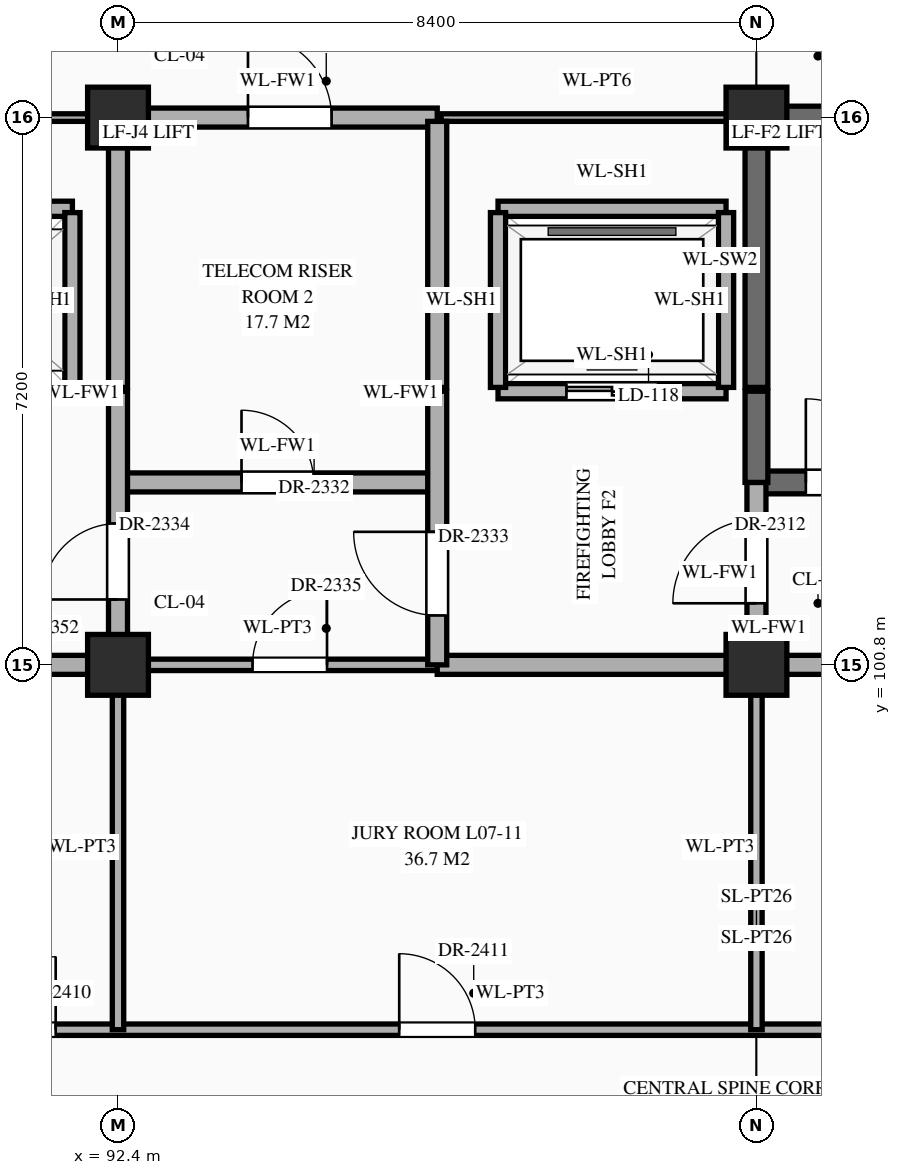
"""IFC4 building model, lengths in metres.
Left out: names, types, materials, properties, quantities, classifications, styles, units other than length and angle.
Written with IfcOpenShell. Run it as: python <this file> out.ifc"""

import sys

from ifc_helpers import new_model, si_unit, direction, frame, frame_2d, origin, origin_2d, place, context, subcontext, project, spatial, rectangle, extrude, element, fill, save


model = new_model("IFC4")
c1 = context("Model", 3, precision=1e-05, world=origin(), true_north=direction((0.0, 1.0)))
c2 = subcontext(c1, "Body", "Model", "MODEL_VIEW")
j1 = project(units=[si_unit("LENGTHUNIT", "METRE"), si_unit("PLANEANGLEUNIT", "RADIAN")], contexts=[c1])
p1 = place(None, origin())
s1 = spatial("IfcSite", under=j1, at=p1, CompositionType="ELEMENT")
p2 = place(p1, origin())
s2 = spatial("IfcBuilding", under=s1, at=p2, CompositionType="ELEMENT")
p3 = place(p2, frame((0.0, 0.0, 30.6)))
s3 = spatial("IfcBuildingStorey", under=s2, at=p3, CompositionType="ELEMENT", Elevation=30.6)
for number, where, z_axis, x_axis in (
    (1, (92.4, 100.8, 0.0), (0.0, 0.0, 1.0), (1.0, 0.0, 0.0)),
    (2, (92.4, 108.0, 0.0), (0.0, 0.0, 1.0), (1.0, 0.0, 0.0)),
    (3, (100.8, 100.8, 0.0), (0.0, 0.0, 1.0), (1.0, 0.0, 0.0)),
    (4, (100.8, 108.0, 0.0), (0.0, 0.0, 1.0), (1.0, 0.0, 0.0)),
):
    element("IfcColumn", number, at=place(p3, frame(where, z_axis=z_axis, x_axis=x_axis)), inside=s3, PredefinedType="COLUMN", context=c2, shape_type="SweptSolid", body=[
        extrude(rectangle(XDim=0.8, YDim=0.8, at=origin_2d()), origin(), (0.0, 0.0, 1.0), 4.5),
    ])
p4 = place(p3, frame((89.8, 96.0, 0.0), z_axis=(0.0, 0.0, 1.0), x_axis=(1.0, 0.0, 0.0)))
e5 = element("IfcWall", 5, at=p4, inside=s3, PredefinedType="STANDARD", context=c2, shape_type="SweptSolid", body=[
    extrude(rectangle(XDim=19.4, YDim=0.15, at=frame_2d((9.7, 0.0))), origin(), (0.0, 0.0, 1.0), 4.24),
])
p5 = place(p4, frame((0.82, 0.0, 0.0)))
e6 = element("IfcOpeningElement", 6, at=p5, cuts=e5, PredefinedType="OPENING", context=c2, shape_type="SweptSolid", body=[
    extrude(rectangle(XDim=0.96, YDim=2.2, at=frame_2d((0.48, 1.1))), frame((0.0, 0.087, 0.0), z_axis=(0.0, -1.0, 0.0), x_axis=(1.0, 0.0, 0.0)), (0.0, 0.0, 1.0), 0.174),
])
p6 = place(p4, frame((6.3, 0.0, 0.0)))
e7 = element("IfcOpeningElement", 7, at=p6, cuts=e5, PredefinedType="OPENING", context=c2, shape_type="SweptSolid", body=[
    extrude(rectangle(XDim=1.0, YDim=2.25, at=frame_2d((0.5, 1.125))), frame((0.0, 0.087, 0.0), z_axis=(0.0, -1.0, 0.0), x_axis=(1.0, 0.0, 0.0)), (0.0, 0.0, 1.0), 0.174),
])
p7 = place(p4, frame((14.68, 0.0, 0.0)))
e8 = element("IfcOpeningElement", 8, at=p7, cuts=e5, PredefinedType="OPENING", context=c2, shape_type="SweptSolid", body=[
    extrude(rectangle(XDim=1.04, YDim=2.2, at=frame_2d((0.52, 1.1))), frame((0.0, 0.087, 0.0), z_axis=(0.0, -1.0, 0.0), x_axis=(1.0, 0.0, 0.0)), (0.0, 0.0, 1.0), 0.174),
])
p8 = place(p3, frame((75.6, 100.8, 0.0), z_axis=(0.0, 0.0, 1.0), x_axis=(1.0, 0.0, 0.0)))
e9 = element("IfcWall", 9, at=p8, inside=s3, PredefinedType="STANDARD", context=c2, shape_type="SweptSolid", body=[
    extrude(rectangle(XDim=16.8, YDim=0.25, at=frame_2d((8.4, 0.0))), origin(), (0.0, 0.0, 1.0), 3.39),
])
p9 = place(p8, frame((3.65, 0.0, 0.0)))
e10 = element("IfcOpeningElement", 10, at=p9, cuts=e9, PredefinedType="OPENING", context=c2, shape_type="SweptSolid", body=[
    extrude(rectangle(XDim=1.1, YDim=2.2, at=frame_2d((0.55, 1.1))), frame((0.0, 0.137, 0.0), z_axis=(0.0, -1.0, 0.0), x_axis=(1.0, 0.0, 0.0)), (0.0, 0.0, 1.0), 0.274),
])
p10 = place(p8, frame((9.785, 0.0, 0.0)))
e11 = element("IfcOpeningElement", 11, at=p10, cuts=e9, PredefinedType="OPENING", context=c2, shape_type="SweptSolid", body=[
    extrude(rectangle(XDim=0.95, YDim=2.15, at=frame_2d((0.475, 1.075))), frame((0.0, 0.137, 0.0), z_axis=(0.0, -1.0, 0.0), x_axis=(1.0, 0.0, 0.0)), (0.0, 0.0, 1.0), 0.274),
])
p11 = place(p8, frame((12.45, 0.0, 0.0)))
e12 = element("IfcOpeningElement", 12, at=p11, cuts=e9, PredefinedType="OPENING", context=c2, shape_type="SweptSolid", body=[
    extrude(rectangle(XDim=1.1, YDim=2.2, at=frame_2d((0.55, 1.1))), frame((0.0, 0.137, 0.0), z_axis=(0.0, -1.0, 0.0), x_axis=(1.0, 0.0, 0.0)), (0.0, 0.0, 1.0), 0.274),
])
p12 = place(p8, frame((14.84, 0.0, 0.0)))
e13 = element("IfcOpeningElement", 13, at=p12, cuts=e9, PredefinedType="OPENING", context=c2, shape_type="SweptSolid", body=[
    extrude(rectangle(XDim=1.0, YDim=2.2, at=frame_2d((0.5, 1.1))), frame((0.0, 0.137, 0.0), z_axis=(0.0, -1.0, 0.0), x_axis=(1.0, 0.0, 0.0)), (0.0, 0.0, 1.0), 0.274),
])
p13 = place(p3, frame((92.4, 100.8, 0.0), z_axis=(0.0, 0.0, 1.0), x_axis=(1.0, 0.0, 0.0)))
e14 = element("IfcWall", 14, at=p13, inside=s3, PredefinedType="STANDARD", context=c2, shape_type="SweptSolid", body=[
    extrude(rectangle(XDim=4.2, YDim=0.15, at=frame_2d((2.1, 0.0))), origin(), (0.0, 0.0, 1.0), 3.39),
])
p14 = place(p13, frame((1.77, 0.0, 0.0)))
e15 = element("IfcOpeningElement", 15, at=p14, cuts=e14, PredefinedType="OPENING", context=c2, shape_type="SweptSolid", body=[
    extrude(rectangle(XDim=0.98, YDim=2.35, at=frame_2d((0.49, 1.175))), frame((0.0, 0.087, 0.0), z_axis=(0.0, -1.0, 0.0), x_axis=(1.0, 0.0, 0.0)), (0.0, 0.0, 1.0), 0.174),
])
p15 = place(p3, frame((96.6, 100.8, 0.0), z_axis=(0.0, 0.0, 1.0), x_axis=(1.0, 0.0, 0.0)))
e16 = element("IfcWall", 16, at=p15, inside=s3, PredefinedType="STANDARD", context=c2, shape_type="SweptSolid", body=[
    extrude(rectangle(XDim=12.6, YDim=0.25, at=frame_2d((6.3, 0.0))), origin(), (0.0, 0.0, 1.0), 3.39),
])
p16 = place(p15, frame((7.925, 0.0, 0.0)))
e17 = element("IfcOpeningElement", 17, at=p16, cuts=e16, PredefinedType="OPENING", context=c2, shape_type="SweptSolid", body=[
    extrude(rectangle(XDim=0.95, YDim=2.15, at=frame_2d((0.475, 1.075))), frame((0.0, 0.137, 0.0), z_axis=(0.0, -1.0, 0.0), x_axis=(1.0, 0.0, 0.0)), (0.0, 0.0, 1.0), 0.274),
])
p17 = place(p3, frame((92.4, 103.2, 0.0), z_axis=(0.0, 0.0, 1.0), x_axis=(1.0, 0.0, 0.0)))
e18 = element("IfcWall", 18, at=p17, inside=s3, PredefinedType="STANDARD", context=c2, shape_type="SweptSolid", body=[
    extrude(rectangle(XDim=4.2, YDim=0.25, at=frame_2d((2.1, 0.0))), origin(), (0.0, 0.0, 1.0), 4.24),
])
p18 = place(p17, frame((1.625, 0.0, 0.0)))
e19 = element("IfcOpeningElement", 19, at=p18, cuts=e18, PredefinedType="OPENING", context=c2, shape_type="SweptSolid", body=[
    extrude(rectangle(XDim=0.95, YDim=2.15, at=frame_2d((0.475, 1.075))), frame((0.0, 0.137, 0.0), z_axis=(0.0, -1.0, 0.0), x_axis=(1.0, 0.0, 0.0)), (0.0, 0.0, 1.0), 0.274),
])
p19 = place(p3, frame((100.8, 103.2, 0.0), z_axis=(0.0, 0.0, 1.0), x_axis=(1.0, 0.0, 0.0)))
e20 = element("IfcWall", 20, at=p19, inside=s3, PredefinedType="SHEAR", context=c2, shape_type="SweptSolid", body=[
    extrude(rectangle(XDim=8.4, YDim=0.3, at=frame_2d((4.2, 0.0))), origin(), (0.0, 0.0, 1.0), 4.24),
])
p20 = place(p19, frame((0.65, 0.0, 0.0)))
e21 = element("IfcOpeningElement", 21, at=p20, cuts=e20, PredefinedType="OPENING", context=c2, shape_type="SweptSolid", body=[
    extrude(rectangle(XDim=1.1, YDim=2.2, at=frame_2d((0.55, 1.1))), frame((0.0, 0.162, 0.0), z_axis=(0.0, -1.0, 0.0), x_axis=(1.0, 0.0, 0.0)), (0.0, 0.0, 1.0), 0.324),
])
p21 = place(p3, frame((89.4, 104.4, 0.0), z_axis=(0.0, 0.0, 1.0), x_axis=(1.0, 0.0, 0.0)))
e22 = element("IfcWall", 22, at=p21, inside=s3, PredefinedType="STANDARD", context=c2, shape_type="SweptSolid", body=[
    extrude(rectangle(XDim=2.4, YDim=0.2, at=frame_2d((1.2, 0.0))), origin(), (0.0, 0.0, 1.0), 4.24),
])
p22 = place(p21, frame((0.7, 0.0, 0.0)))
e23 = element("IfcOpeningElement", 23, at=p22, cuts=e22, PredefinedType="OPENING", context=c2, shape_type="SweptSolid", body=[
    extrude(rectangle(XDim=1.0, YDim=2.15, at=frame_2d((0.5, 1.075))), frame((0.0, 0.112, 0.0), z_axis=(0.0, -1.0, 0.0), x_axis=(1.0, 0.0, 0.0)), (0.0, 0.0, 1.0), 0.224),
])
p23 = place(p3, frame((97.4, 104.4, 0.0), z_axis=(0.0, 0.0, 1.0), x_axis=(1.0, 0.0, 0.0)))
e24 = element("IfcWall", 24, at=p23, inside=s3, PredefinedType="STANDARD", context=c2, shape_type="SweptSolid", body=[
    extrude(rectangle(XDim=3.0, YDim=0.2, at=frame_2d((1.5, 0.0))), origin(), (0.0, 0.0, 1.0), 4.24),
])
p24 = place(p23, frame((0.9, 0.0, 0.0)))
e25 = element("IfcOpeningElement", 25, at=p24, cuts=e24, PredefinedType="OPENING", context=c2, shape_type="SweptSolid", body=[
    extrude(rectangle(XDim=1.2, YDim=2.15, at=frame_2d((0.6, 1.075))), frame((0.0, 0.112, 0.0), z_axis=(0.0, -1.0, 0.0), x_axis=(1.0, 0.0, 0.0)), (0.0, 0.0, 1.0), 0.224),
])
p25 = place(p3, frame((89.4, 106.8, 0.0), z_axis=(0.0, 0.0, 1.0), x_axis=(1.0, 0.0, 0.0)))
e26 = element("IfcWall", 26, at=p25, inside=s3, PredefinedType="STANDARD", context=c2, shape_type="SweptSolid", body=[
    extrude(rectangle(XDim=2.4, YDim=0.2, at=frame_2d((1.2, 0.0))), origin(), (0.0, 0.0, 1.0), 4.24),
])
p26 = place(p3, frame((97.4, 106.8, 0.0), z_axis=(0.0, 0.0, 1.0), x_axis=(1.0, 0.0, 0.0)))
e27 = element("IfcWall", 27, at=p26, inside=s3, PredefinedType="STANDARD", context=c2, shape_type="SweptSolid", body=[
    extrude(rectangle(XDim=3.0, YDim=0.2, at=frame_2d((1.5, 0.0))), origin(), (0.0, 0.0, 1.0), 4.24),
])
p27 = place(p3, frame((86.2, 108.0, 0.0), z_axis=(0.0, 0.0, 1.0), x_axis=(1.0, 0.0, 0.0)))
e28 = element("IfcWall", 28, at=p27, inside=s3, PredefinedType="STANDARD", context=c2, shape_type="SweptSolid", body=[
    extrude(rectangle(XDim=6.15, YDim=0.1, at=frame_2d((3.075, 0.0))), origin(), (0.0, 0.0, 1.0), 3.39),
])
p28 = place(p3, frame((92.4, 108.0, 0.0), z_axis=(0.0, 0.0, 1.0), x_axis=(1.0, 0.0, 0.0)))
e29 = element("IfcWall", 29, at=p28, inside=s3, PredefinedType="STANDARD", context=c2, shape_type="SweptSolid", body=[
    extrude(rectangle(XDim=4.2, YDim=0.25, at=frame_2d((2.1, 0.0))), origin(), (0.0, 0.0, 1.0), 3.39),
])
p29 = place(p28, frame((1.71, 0.0, 0.0)))
e30 = element("IfcOpeningElement", 30, at=p29, cuts=e29, PredefinedType="OPENING", context=c2, shape_type="SweptSolid", body=[
    extrude(rectangle(XDim=1.1, YDim=2.2, at=frame_2d((0.55, 1.1))), frame((0.0, 0.137, 0.0), z_axis=(0.0, -1.0, 0.0), x_axis=(1.0, 0.0, 0.0)), (0.0, 0.0, 1.0), 0.274),
])
p30 = place(p3, frame((96.65, 108.0, 0.0), z_axis=(0.0, 0.0, 1.0), x_axis=(1.0, 0.0, 0.0)))
e31 = element("IfcWall", 31, at=p30, inside=s3, PredefinedType="STANDARD", context=c2, shape_type="SweptSolid", body=[
    extrude(rectangle(XDim=4.1, YDim=0.1, at=frame_2d((2.05, 0.0))), origin(), (0.0, 0.0, 1.0), 3.39),
])
p31 = place(p3, frame((100.8, 108.0, 0.0), z_axis=(0.0, 0.0, 1.0), x_axis=(1.0, 0.0, 0.0)))
e32 = element("IfcWall", 32, at=p31, inside=s3, PredefinedType="SHEAR", context=c2, shape_type="SweptSolid", body=[
    extrude(rectangle(XDim=8.4, YDim=0.3, at=frame_2d((4.2, 0.0))), origin(), (0.0, 0.0, 1.0), 4.24),
])
p32 = place(p3, frame((91.8, 104.45, 0.0), z_axis=(0.0, 0.0, 1.0), x_axis=(0.0, 1.0, 0.0)))
e33 = element("IfcWall", 33, at=p32, inside=s3, PredefinedType="STANDARD", context=c2, shape_type="SweptSolid", body=[
    extrude(rectangle(XDim=2.3, YDim=0.2, at=frame_2d((1.15, 0.0))), origin(), (0.0, 0.0, 1.0), 4.24),
])
p33 = place(p3, frame((92.4, 96.0, 0.0), z_axis=(0.0, 0.0, 1.0), x_axis=(0.0, 1.0, 0.0)))
e34 = element("IfcWall", 34, at=p33, inside=s3, PredefinedType="STANDARD", context=c2, shape_type="SweptSolid", body=[
    extrude(rectangle(XDim=4.8, YDim=0.15, at=frame_2d((2.4, 0.0))), origin(), (0.0, 0.0, 1.0), 3.49),
])
p34 = place(p3, frame((92.4, 100.8, 0.0), z_axis=(0.0, 0.0, 1.0), x_axis=(0.0, 1.0, 0.0)))
e35 = element("IfcWall", 35, at=p34, inside=s3, PredefinedType="STANDARD", context=c2, shape_type="SweptSolid", body=[
    extrude(rectangle(XDim=3.6, YDim=0.25, at=frame_2d((1.8, 0.0))), origin(), (0.0, 0.0, 1.0), 3.49),
])
p35 = place(p34, frame((0.86, 0.0, 0.0)))
e36 = element("IfcOpeningElement", 36, at=p35, cuts=e35, PredefinedType="OPENING", context=c2, shape_type="SweptSolid", body=[
    extrude(rectangle(XDim=1.0, YDim=2.2, at=frame_2d((0.5, 1.1))), frame((0.0, 0.137, 0.0), z_axis=(0.0, -1.0, 0.0), x_axis=(1.0, 0.0, 0.0)), (0.0, 0.0, 1.0), 0.274),
])
p36 = place(p3, frame((92.4, 104.45, 0.0), z_axis=(0.0, 0.0, 1.0), x_axis=(0.0, 1.0, 0.0)))
e37 = element("IfcWall", 37, at=p36, inside=s3, PredefinedType="STANDARD", context=c2, shape_type="SweptSolid", body=[
    extrude(rectangle(XDim=3.5, YDim=0.25, at=frame_2d((1.75, 0.0))), origin(), (0.0, 0.0, 1.0), 3.49),
])
p37 = place(p3, frame((96.6, 100.8, 0.0), z_axis=(0.0, 0.0, 1.0), x_axis=(0.0, 1.0, 0.0)))
e38 = element("IfcWall", 38, at=p37, inside=s3, PredefinedType="STANDARD", context=c2, shape_type="SweptSolid", body=[
    extrude(rectangle(XDim=3.6, YDim=0.25, at=frame_2d((1.8, 0.0))), origin(), (0.0, 0.0, 1.0), 3.89),
])
p38 = place(p37, frame((0.65, 0.0, 0.0)))
e39 = element("IfcOpeningElement", 39, at=p38, cuts=e38, PredefinedType="OPENING", context=c2, shape_type="SweptSolid", body=[
    extrude(rectangle(XDim=1.1, YDim=2.2, at=frame_2d((0.55, 1.1))), frame((0.0, 0.137, 0.0), z_axis=(0.0, -1.0, 0.0), x_axis=(1.0, 0.0, 0.0)), (0.0, 0.0, 1.0), 0.274),
])
p39 = place(p3, frame((96.6, 104.45, 0.0), z_axis=(0.0, 0.0, 1.0), x_axis=(0.0, 1.0, 0.0)))
e40 = element("IfcWall", 40, at=p39, inside=s3, PredefinedType="STANDARD", context=c2, shape_type="SweptSolid", body=[
    extrude(rectangle(XDim=3.5, YDim=0.25, at=frame_2d((1.75, 0.0))), origin(), (0.0, 0.0, 1.0), 3.89),
])
for number, where, z_axis, x_axis in (
    (41, (97.4, 104.45, 0.0), (0.0, 0.0, 1.0), (0.0, 1.0, 0.0)),
    (42, (100.4, 104.45, 0.0), (0.0, 0.0, 1.0), (0.0, 1.0, 0.0)),
):
    element("IfcWall", number, at=place(p3, frame(where, z_axis=z_axis, x_axis=x_axis)), inside=s3, PredefinedType="STANDARD", context=c2, shape_type="SweptSolid", body=[
        extrude(rectangle(XDim=2.3, YDim=0.2, at=frame_2d((1.15, 0.0))), origin(), (0.0, 0.0, 1.0), 4.24),
    ])
p40 = place(p3, frame((100.8, 96.0, 0.0), z_axis=(0.0, 0.0, 1.0), x_axis=(0.0, 1.0, 0.0)))
e43 = element("IfcWall", 43, at=p40, inside=s3, PredefinedType="STANDARD", context=c2, shape_type="SweptSolid", body=[
    extrude(rectangle(XDim=4.8, YDim=0.15, at=frame_2d((2.4, 0.0))), origin(), (0.0, 0.0, 1.0), 3.49),
])
p41 = place(p3, frame((100.8, 100.8, 0.0), z_axis=(0.0, 0.0, 1.0), x_axis=(0.0, 1.0, 0.0)))
e44 = element("IfcWall", 44, at=p41, inside=s3, PredefinedType="STANDARD", context=c2, shape_type="SweptSolid", body=[
    extrude(rectangle(XDim=2.4, YDim=0.25, at=frame_2d((1.2, 0.0))), origin(), (0.0, 0.0, 1.0), 3.49),
])
p42 = place(p41, frame((0.81, 0.0, 0.0)))
e45 = element("IfcOpeningElement", 45, at=p42, cuts=e44, PredefinedType="OPENING", context=c2, shape_type="SweptSolid", body=[
    extrude(rectangle(XDim=1.1, YDim=2.2, at=frame_2d((0.55, 1.1))), frame((0.0, 0.137, 0.0), z_axis=(0.0, -1.0, 0.0), x_axis=(1.0, 0.0, 0.0)), (0.0, 0.0, 1.0), 0.274),
])
p43 = place(p3, frame((100.8, 103.2, 0.0), z_axis=(0.0, 0.0, 1.0), x_axis=(0.0, 1.0, 0.0)))
e46 = element("IfcWall", 46, at=p43, inside=s3, PredefinedType="SHEAR", context=c2, shape_type="SweptSolid", body=[
    extrude(rectangle(XDim=1.2, YDim=0.3, at=frame_2d((0.6, 0.0))), origin(), (0.0, 0.0, 1.0), 4.24),
])
p44 = place(p3, frame((100.8, 104.45, 0.0), z_axis=(0.0, 0.0, 1.0), x_axis=(0.0, 1.0, 0.0)))
e47 = element("IfcWall", 47, at=p44, inside=s3, PredefinedType="SHEAR", context=c2, shape_type="SweptSolid", body=[
    extrude(rectangle(XDim=3.5, YDim=0.3, at=frame_2d((1.75, 0.0))), origin(), (0.0, 0.0, 1.0), 4.24),
])
p45 = place(p24, origin())
e48 = element("IfcDoor", 48, at=p45, inside=s3, OperationType="DOUBLE_DOOR_SLIDING", PredefinedType="DOOR", context=c2, shape_type="SweptSolid", body=[
    extrude(rectangle(XDim=1.2, YDim=2.15, at=frame_2d((0.6, 1.075))), frame((0.0, 0.025, 0.0), z_axis=(0.0, -1.0, 0.0), x_axis=(1.0, 0.0, 0.0)), (0.0, 0.0, 1.0), 0.05),
])
fill(e25, e48)
p46 = place(p20, origin())
e49 = element("IfcDoor", 49, at=p46, inside=s3, OperationType="SINGLE_SWING_LEFT", PredefinedType="DOOR", context=c2, shape_type="SweptSolid", body=[
    extrude(rectangle(XDim=1.1, YDim=2.2, at=frame_2d((0.55, 1.1))), frame((0.0, 0.025, 0.0), z_axis=(0.0, -1.0, 0.0), x_axis=(1.0, 0.0, 0.0)), (0.0, 0.0, 1.0), 0.05),
])
fill(e21, e49)
p47 = place(p42, origin())
e50 = element("IfcDoor", 50, at=p47, inside=s3, OperationType="SINGLE_SWING_LEFT", PredefinedType="DOOR", context=c2, shape_type="SweptSolid", body=[
    extrude(rectangle(XDim=1.1, YDim=2.2, at=frame_2d((0.55, 1.1))), frame((0.0, 0.025, 0.0), z_axis=(0.0, -1.0, 0.0), x_axis=(1.0, 0.0, 0.0)), (0.0, 0.0, 1.0), 0.05),
])
fill(e45, e50)
p48 = place(p18, origin())
e51 = element("IfcDoor", 51, at=p48, inside=s3, OperationType="SINGLE_SWING_LEFT", PredefinedType="DOOR", context=c2, shape_type="SweptSolid", body=[
    extrude(rectangle(XDim=0.95, YDim=2.15, at=frame_2d((0.475, 1.075))), frame((0.0, 0.025, 0.0), z_axis=(0.0, -1.0, 0.0), x_axis=(1.0, 0.0, 0.0)), (0.0, 0.0, 1.0), 0.05),
])
fill(e19, e51)
p49 = place(p38, origin())
e52 = element("IfcDoor", 52, at=p49, inside=s3, OperationType="SINGLE_SWING_RIGHT", PredefinedType="DOOR", context=c2, shape_type="SweptSolid", body=[
    extrude(rectangle(XDim=1.1, YDim=2.2, at=frame_2d((0.55, 1.1))), frame((0.0, 0.025, 0.0), z_axis=(0.0, -1.0, 0.0), x_axis=(1.0, 0.0, 0.0)), (0.0, 0.0, 1.0), 0.05),
])
fill(e39, e52)
p50 = place(p35, origin())
e53 = element("IfcDoor", 53, at=p50, inside=s3, OperationType="SINGLE_SWING_LEFT", PredefinedType="DOOR", context=c2, shape_type="SweptSolid", body=[
    extrude(rectangle(XDim=1.0, YDim=2.2, at=frame_2d((0.5, 1.1))), frame((0.0, 0.025, 0.0), z_axis=(0.0, -1.0, 0.0), x_axis=(1.0, 0.0, 0.0)), (0.0, 0.0, 1.0), 0.05),
])
fill(e36, e53)
p51 = place(p14, origin())
e54 = element("IfcDoor", 54, at=p51, inside=s3, OperationType="SINGLE_SWING_RIGHT", PredefinedType="DOOR", context=c2, shape_type="SweptSolid", body=[
    extrude(rectangle(XDim=0.98, YDim=2.35, at=frame_2d((0.49, 1.175))), frame((0.0, 0.025, 0.0), z_axis=(0.0, -1.0, 0.0), x_axis=(1.0, 0.0, 0.0)), (0.0, 0.0, 1.0), 0.05),
])
fill(e15, e54)
p52 = place(p29, origin())
e55 = element("IfcDoor", 55, at=p52, inside=s3, OperationType="SINGLE_SWING_LEFT", PredefinedType="DOOR", context=c2, shape_type="SweptSolid", body=[
    extrude(rectangle(XDim=1.1, YDim=2.2, at=frame_2d((0.55, 1.1))), frame((0.0, 0.025, 0.0), z_axis=(0.0, -1.0, 0.0), x_axis=(1.0, 0.0, 0.0)), (0.0, 0.0, 1.0), 0.05),
])
fill(e30, e55)
p53 = place(p5, origin())
e56 = element("IfcDoor", 56, at=p53, inside=s3, OperationType="SINGLE_SWING_RIGHT", PredefinedType="DOOR", context=c2, shape_type="SweptSolid", body=[
    extrude(rectangle(XDim=0.96, YDim=2.2, at=frame_2d((0.48, 1.1))), frame((0.0, 0.025, 0.0), z_axis=(0.0, -1.0, 0.0), x_axis=(1.0, 0.0, 0.0)), (0.0, 0.0, 1.0), 0.05),
])
fill(e6, e56)
p54 = place(p6, origin())
e57 = element("IfcDoor", 57, at=p54, inside=s3, OperationType="SINGLE_SWING_LEFT", PredefinedType="DOOR", context=c2, shape_type="SweptSolid", body=[
    extrude(rectangle(XDim=1.0, YDim=2.25, at=frame_2d((0.5, 1.125))), frame((0.0, 0.025, 0.0), z_axis=(0.0, -1.0, 0.0), x_axis=(1.0, 0.0, 0.0)), (0.0, 0.0, 1.0), 0.05),
])
fill(e7, e57)
save(model, sys.argv[1])
